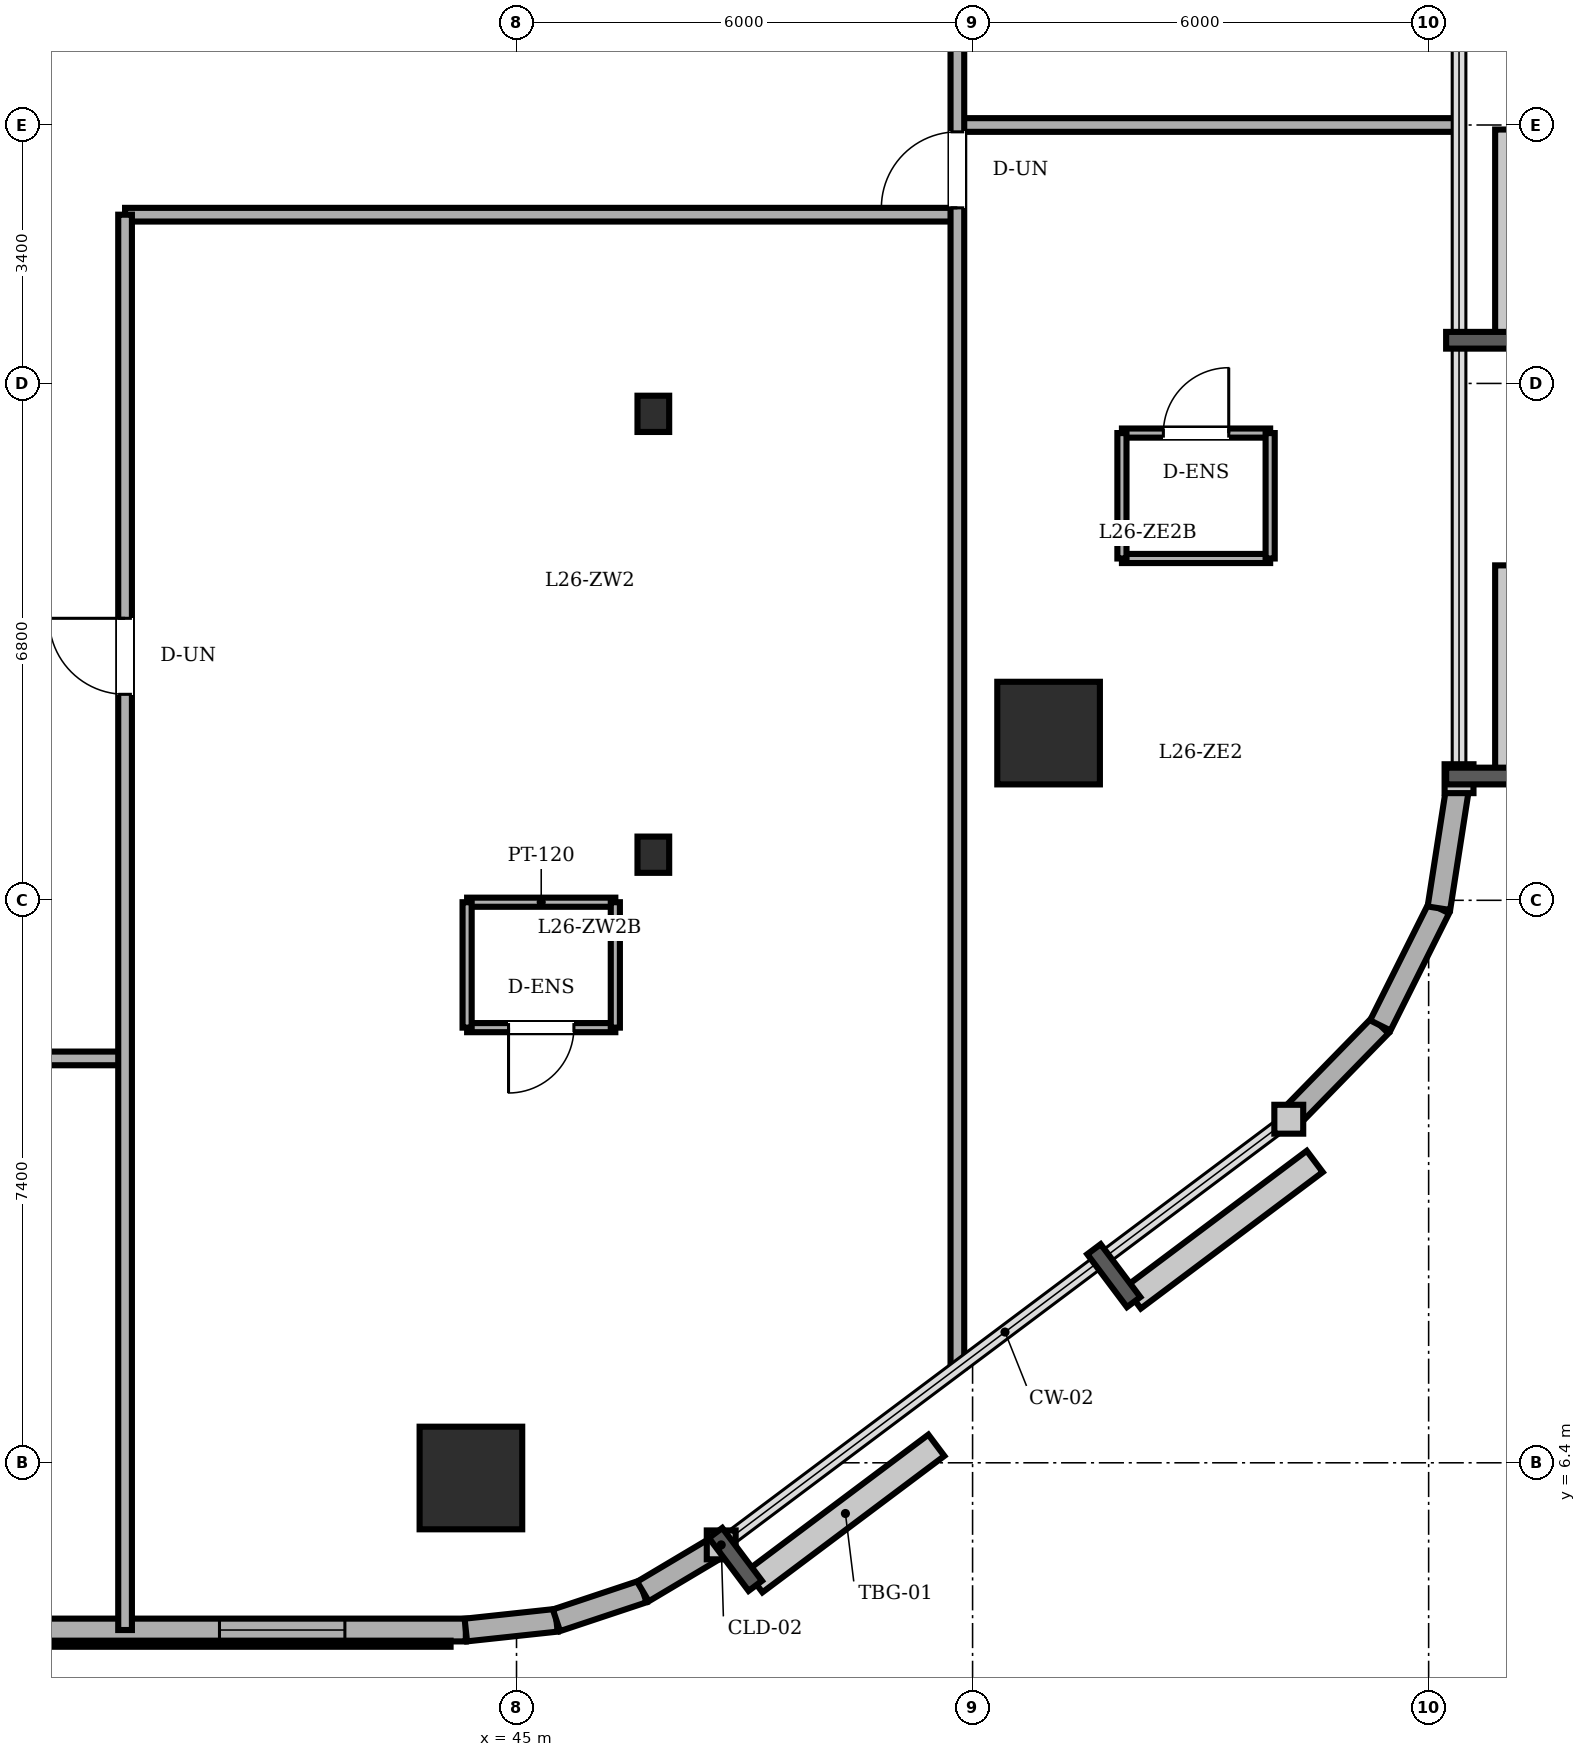
"""IFC4 building model, lengths in metres.
Left out: names, types, materials, properties, quantities, classifications, styles, units other than length and angle.
Written with IfcOpenShell. Run it as: python <this file> out.ifc"""

import sys

from ifc_helpers import new_model, si_unit, direction, frame, frame_2d, origin, origin_2d, place, context, subcontext, project, spatial, rectangle, circle, i_section, extrude, element, fill, save


model = new_model("IFC4")
c1 = context("Model", 3, precision=1e-05, world=origin(), true_north=direction((0.0, 1.0)))
c2 = subcontext(c1, "Body", "Model", "MODEL_VIEW")
j1 = project(units=[si_unit("LENGTHUNIT", "METRE"), si_unit("PLANEANGLEUNIT", "RADIAN")], contexts=[c1])
p1 = place(None, origin())
s1 = spatial("IfcSite", under=j1, at=p1, CompositionType="ELEMENT")
p2 = place(p1, origin())
s2 = spatial("IfcBuilding", under=s1, at=p2, CompositionType="ELEMENT")
p3 = place(p2, frame((0.0, 0.0, 100.7)))
s3 = spatial("IfcBuildingStorey", under=s2, at=p3, CompositionType="ELEMENT", Elevation=100.7)
for number, where, z_axis, x_axis in (
    (1, (44.4, 6.2, 0.0), (0.0, 0.0, 1.0), (1.0, 0.0, 0.0)),
    (2, (52.0, 16.0, 0.0), (0.0, 0.0, 1.0), (1.0, 0.0, 0.0)),
):
    element("IfcColumn", number, at=place(p3, frame(where, z_axis=z_axis, x_axis=x_axis)), inside=s3, PredefinedType="COLUMN", context=c2, shape_type="SweptSolid", body=[
        extrude(circle(Radius=0.675, at=origin_2d()), origin(), (0.0, 0.0, 1.0), 3.6),
    ])
for number, where, z_axis, x_axis in (
    (3, (46.8, 14.4, 0.0), (0.0, 0.0, 1.0), (1.0, 0.0, 0.0)),
    (4, (46.8, 20.2, 0.0), (0.0, 0.0, 1.0), (1.0, 0.0, 0.0)),
):
    element("IfcColumn", number, at=place(p3, frame(where, z_axis=z_axis, x_axis=x_axis)), inside=s3, PredefinedType="COLUMN", context=c2, shape_type="SweptSolid", body=[
        extrude(i_section(OverallWidth=0.417, OverallDepth=0.477, WebThickness=0.036, FlangeThickness=0.057, FilletRadius=0.015, at=origin_2d()), origin(), (0.0, 0.0, 1.0), 3.6),
    ])
p4 = place(p3, frame((14.4, 4.2, 0.0), z_axis=(0.0, 0.0, 1.0), x_axis=(1.0, 0.0, 0.0)))
e5 = element("IfcWall", 5, at=p4, inside=s3, PredefinedType="SOLIDWALL", context=c2, shape_type="SweptSolid", body=[
    extrude(rectangle(XDim=29.933, YDim=0.3, at=frame_2d((14.967, 0.0))), origin(), (0.0, 0.0, 1.0), 3.4),
])
p5 = place(p4, frame((3.85, 0.0, 0.0)))
e6 = element("IfcOpeningElement", 6, at=p5, cuts=e5, PredefinedType="OPENING", context=c2, shape_type="SweptSolid", body=[
    extrude(rectangle(XDim=0.95, YDim=2.2, at=frame_2d((0.475, 1.1))), frame((0.0, 0.16, 0.0), z_axis=(0.0, -1.0, 0.0), x_axis=(1.0, 0.0, 0.0)), (0.0, 0.0, 1.0), 0.32),
])
p6 = place(p4, frame((5.158, 0.0, 0.85)))
e7 = element("IfcOpeningElement", 7, at=p6, cuts=e5, PredefinedType="OPENING", context=c2, shape_type="SweptSolid", body=[
    extrude(rectangle(XDim=1.65, YDim=1.55, at=frame_2d((0.825, 0.775))), frame((0.0, 0.16, 0.0), z_axis=(0.0, -1.0, 0.0), x_axis=(1.0, 0.0, 0.0)), (0.0, 0.0, 1.0), 0.32),
])
p7 = place(p4, frame((9.875, 0.0, 0.85)))
e8 = element("IfcOpeningElement", 8, at=p7, cuts=e5, PredefinedType="OPENING", context=c2, shape_type="SweptSolid", body=[
    extrude(rectangle(XDim=1.65, YDim=1.55, at=frame_2d((0.825, 0.775))), frame((0.0, 0.16, 0.0), z_axis=(0.0, -1.0, 0.0), x_axis=(1.0, 0.0, 0.0)), (0.0, 0.0, 1.0), 0.32),
])
p8 = place(p4, frame((16.058, 0.0, 0.85)))
e9 = element("IfcOpeningElement", 9, at=p8, cuts=e5, PredefinedType="OPENING", context=c2, shape_type="SweptSolid", body=[
    extrude(rectangle(XDim=1.65, YDim=1.55, at=frame_2d((0.825, 0.775))), frame((0.0, 0.16, 0.0), z_axis=(0.0, -1.0, 0.0), x_axis=(1.0, 0.0, 0.0)), (0.0, 0.0, 1.0), 0.32),
])
p9 = place(p4, frame((20.342, 0.0, 0.85)))
e10 = element("IfcOpeningElement", 10, at=p9, cuts=e5, PredefinedType="OPENING", context=c2, shape_type="SweptSolid", body=[
    extrude(rectangle(XDim=1.65, YDim=1.55, at=frame_2d((0.825, 0.775))), frame((0.0, 0.16, 0.0), z_axis=(0.0, -1.0, 0.0), x_axis=(1.0, 0.0, 0.0)), (0.0, 0.0, 1.0), 0.32),
])
p10 = place(p4, frame((26.692, 0.0, 0.85)))
e11 = element("IfcOpeningElement", 11, at=p10, cuts=e5, PredefinedType="OPENING", context=c2, shape_type="SweptSolid", body=[
    extrude(rectangle(XDim=1.65, YDim=1.55, at=frame_2d((0.825, 0.775))), frame((0.0, 0.16, 0.0), z_axis=(0.0, -1.0, 0.0), x_axis=(1.0, 0.0, 0.0)), (0.0, 0.0, 1.0), 0.32),
])
p11 = place(p3, frame((44.333, 4.2, 0.0), z_axis=(0.0, 0.0, 1.0), x_axis=(0.994289103787, 0.106720092254, 0.0)))
e12 = element("IfcWall", 12, at=p11, inside=s3, PredefinedType="SOLIDWALL", context=c2, shape_type="SweptSolid", body=[
    extrude(rectangle(XDim=1.199, YDim=0.3, at=frame_2d((0.599, 0.0))), origin(), (0.0, 0.0, 1.0), 3.4),
])
p12 = place(p3, frame((45.525, 4.328, 0.0), z_axis=(0.0, 0.0, 1.0), x_axis=(0.948744332129, 0.316044604847, 0.0)))
e13 = element("IfcWall", 13, at=p12, inside=s3, PredefinedType="SOLIDWALL", context=c2, shape_type="SweptSolid", body=[
    extrude(rectangle(XDim=1.2, YDim=0.3, at=frame_2d((0.6, 0.0))), origin(), (0.0, 0.0, 1.0), 3.4),
])
p13 = place(p3, frame((46.663, 4.707, 0.0), z_axis=(0.0, 0.0, 1.0), x_axis=(0.859320591642, 0.511437308749, 0.0)))
e14 = element("IfcWall", 14, at=p13, inside=s3, PredefinedType="SOLIDWALL", context=c2, shape_type="SweptSolid", body=[
    extrude(rectangle(XDim=1.199, YDim=0.3, at=frame_2d((0.599, 0.0))), origin(), (0.0, 0.0, 1.0), 3.4),
])
for number, where, z_axis, x_axis in (
    (15, (55.16, 10.92, 0.0), (0.0, 0.0, 1.0), (0.698, 0.716, 0.0)),
    (16, (56.364, 12.154, 0.0), (0.0, 0.0, 1.0), (0.447, 0.894, 0.0)),
):
    element("IfcWall", number, at=place(p3, frame(where, z_axis=z_axis, x_axis=x_axis)), inside=s3, PredefinedType="SOLIDWALL", context=c2, shape_type="SweptSolid", body=[
        extrude(rectangle(XDim=1.724, YDim=0.3, at=frame_2d((0.862, 0.0))), origin(), (0.0, 0.0, 1.0), 3.4),
    ])
p14 = place(p3, frame((57.135, 13.696, 0.0), z_axis=(0.0, 0.0, 1.0), x_axis=(0.153620989032, 0.988129845581, 0.0)))
e17 = element("IfcWall", 17, at=p14, inside=s3, PredefinedType="SOLIDWALL", context=c2, shape_type="SweptSolid", body=[
    extrude(rectangle(XDim=1.724, YDim=0.3, at=frame_2d((0.862, 0.0))), origin(), (0.0, 0.0, 1.0), 3.4),
])
p15 = place(p3, frame((44.35, 13.775, 0.0), z_axis=(0.0, 0.0, 1.0), x_axis=(1.0, 0.0, 0.0)))
e18 = element("IfcWall", 18, at=p15, inside=s3, PredefinedType="PARTITIONING", context=c2, shape_type="SweptSolid", body=[
    extrude(rectangle(XDim=1.95, YDim=0.12, at=frame_2d((0.975, 0.0))), origin(), (0.0, 0.0, 1.0), 3.4),
])
p16 = place(p3, frame((46.3, 12.125, 0.0), z_axis=(0.0, 0.0, 1.0), x_axis=(-1.0, 0.0, 0.0)))
e19 = element("IfcWall", 19, at=p16, inside=s3, PredefinedType="PARTITIONING", context=c2, shape_type="SweptSolid", body=[
    extrude(rectangle(XDim=1.95, YDim=0.12, at=frame_2d((0.975, 0.0))), origin(), (0.0, 0.0, 1.0), 3.4),
])
p17 = place(p16, frame((0.545, 0.0, 0.0)))
e20 = element("IfcOpeningElement", 20, at=p17, cuts=e19, PredefinedType="OPENING", context=c2, shape_type="SweptSolid", body=[
    extrude(rectangle(XDim=0.86, YDim=2.1, at=frame_2d((0.43, 1.05))), frame((0.0, 0.07, 0.0), z_axis=(0.0, -1.0, 0.0), x_axis=(1.0, 0.0, 0.0)), (0.0, 0.0, 1.0), 0.14),
])
p18 = place(p3, frame((44.35, 13.775, 0.0), z_axis=(0.0, 0.0, 1.0), x_axis=(0.0, -1.0, 0.0)))
e21 = element("IfcWall", 21, at=p18, inside=s3, PredefinedType="PARTITIONING", context=c2, shape_type="SweptSolid", body=[
    extrude(rectangle(XDim=1.65, YDim=0.12, at=frame_2d((0.825, 0.0))), origin(), (0.0, 0.0, 1.0), 3.4),
])
p19 = place(p3, frame((46.3, 12.125, 0.0), z_axis=(0.0, 0.0, 1.0), x_axis=(0.0, 1.0, 0.0)))
e22 = element("IfcWall", 22, at=p19, inside=s3, PredefinedType="PARTITIONING", context=c2, shape_type="SweptSolid", body=[
    extrude(rectangle(XDim=1.65, YDim=0.12, at=frame_2d((0.825, 0.0))), origin(), (0.0, 0.0, 1.0), 2.882),
])
p20 = place(p3, frame((52.965, 19.947, 0.0), z_axis=(0.0, 0.0, 1.0), x_axis=(1.0, 0.0, 0.0)))
e23 = element("IfcWall", 23, at=p20, inside=s3, PredefinedType="PARTITIONING", context=c2, shape_type="SweptSolid", body=[
    extrude(rectangle(XDim=1.95, YDim=0.12, at=frame_2d((0.975, 0.0))), origin(), (0.0, 0.0, 1.0), 3.4),
])
p21 = place(p20, frame((0.545, 0.0, 0.0)))
e24 = element("IfcOpeningElement", 24, at=p21, cuts=e23, PredefinedType="OPENING", context=c2, shape_type="SweptSolid", body=[
    extrude(rectangle(XDim=0.86, YDim=2.1, at=frame_2d((0.43, 1.05))), frame((0.0, 0.07, 0.0), z_axis=(0.0, -1.0, 0.0), x_axis=(1.0, 0.0, 0.0)), (0.0, 0.0, 1.0), 0.14),
])
p22 = place(p3, frame((54.915, 18.297, 0.0), z_axis=(0.0, 0.0, 1.0), x_axis=(-1.0, 0.0, 0.0)))
e25 = element("IfcWall", 25, at=p22, inside=s3, PredefinedType="PARTITIONING", context=c2, shape_type="SweptSolid", body=[
    extrude(rectangle(XDim=1.95, YDim=0.12, at=frame_2d((0.975, 0.0))), origin(), (0.0, 0.0, 1.0), 3.4),
])
for number, where, z_axis, x_axis in (
    (26, (52.965, 19.947, 0.0), (0.0, 0.0, 1.0), (0.0, -1.0, 0.0)),
    (27, (54.915, 18.297, 0.0), (0.0, 0.0, 1.0), (0.0, 1.0, 0.0)),
):
    element("IfcWall", number, at=place(p3, frame(where, z_axis=z_axis, x_axis=x_axis)), inside=s3, PredefinedType="PARTITIONING", context=c2, shape_type="SweptSolid", body=[
        extrude(rectangle(XDim=1.65, YDim=0.12, at=frame_2d((0.825, 0.0))), origin(), (0.0, 0.0, 1.0), 3.4),
    ])
p23 = place(p3, frame((8.8, 11.72, 0.0), z_axis=(0.0, 0.0, 1.0), x_axis=(1.0, 0.0, 0.0)))
e28 = element("IfcWall", 28, at=p23, inside=s3, PredefinedType="PARTITIONING", context=c2, shape_type="SweptSolid", body=[
    extrude(rectangle(XDim=31.05, YDim=0.18, at=frame_2d((15.525, 0.0))), origin(), (0.0, 0.0, 1.0), 3.4),
])
p24 = place(p23, frame((15.84, 0.0, 0.0)))
e29 = element("IfcOpeningElement", 29, at=p24, cuts=e28, PredefinedType="OPENING", context=c2, shape_type="SweptSolid", body=[
    extrude(rectangle(XDim=0.92, YDim=2.1, at=frame_2d((0.46, 1.05))), frame((0.0, 0.1, 0.0), z_axis=(0.0, -1.0, 0.0), x_axis=(1.0, 0.0, 0.0)), (0.0, 0.0, 1.0), 0.2),
])
p25 = place(p23, frame((7.34, 0.0, 0.0)))
e30 = element("IfcOpeningElement", 30, at=p25, cuts=e28, PredefinedType="OPENING", context=c2, shape_type="SweptSolid", body=[
    extrude(rectangle(XDim=0.92, YDim=2.1, at=frame_2d((0.46, 1.05))), frame((0.0, 0.1, 0.0), z_axis=(0.0, -1.0, 0.0), x_axis=(1.0, 0.0, 0.0)), (0.0, 0.0, 1.0), 0.2),
])
p26 = place(p23, frame((23.905, 0.0, 0.0)))
e31 = element("IfcOpeningElement", 31, at=p26, cuts=e28, PredefinedType="OPENING", context=c2, shape_type="SweptSolid", body=[
    extrude(rectangle(XDim=0.92, YDim=2.1, at=frame_2d((0.46, 1.05))), frame((0.0, 0.1, 0.0), z_axis=(0.0, -1.0, 0.0), x_axis=(1.0, 0.0, 0.0)), (0.0, 0.0, 1.0), 0.2),
])
p27 = place(p3, frame((39.85, 22.82, 0.0), z_axis=(0.0, 0.0, 1.0), x_axis=(1.0, 0.0, 0.0)))
e32 = element("IfcWall", 32, at=p27, inside=s3, PredefinedType="PARTITIONING", context=c2, shape_type="SweptSolid", body=[
    extrude(rectangle(XDim=10.95, YDim=0.18, at=frame_2d((5.475, 0.0))), origin(), (0.0, 0.0, 1.0), 3.4),
])
p28 = place(p3, frame((50.8, 24.0, 0.0), z_axis=(0.0, 0.0, 1.0), x_axis=(1.0, 0.0, 0.0)))
e33 = element("IfcWall", 33, at=p28, inside=s3, PredefinedType="PARTITIONING", context=c2, shape_type="SweptSolid", body=[
    extrude(rectangle(XDim=6.6, YDim=0.18, at=frame_2d((3.3, 0.0))), origin(), (0.0, 0.0, 1.0), 3.182),
])
p29 = place(p3, frame((39.85, 4.2, 0.0), z_axis=(0.0, 0.0, 1.0), x_axis=(0.0, 1.0, 0.0)))
e34 = element("IfcWall", 34, at=p29, inside=s3, PredefinedType="PARTITIONING", context=c2, shape_type="SweptSolid", body=[
    extrude(rectangle(XDim=18.62, YDim=0.18, at=frame_2d((9.31, 0.0))), origin(), (0.0, 0.0, 1.0), 3.4),
])
p30 = place(p29, frame((12.31, 0.0, 0.0)))
e35 = element("IfcOpeningElement", 35, at=p30, cuts=e34, PredefinedType="OPENING", context=c2, shape_type="SweptSolid", body=[
    extrude(rectangle(XDim=1.0, YDim=2.15, at=frame_2d((0.5, 1.075))), frame((0.0, 0.1, 0.0), z_axis=(0.0, -1.0, 0.0), x_axis=(1.0, 0.0, 0.0)), (0.0, 0.0, 1.0), 0.2),
])
p31 = place(p3, frame((50.8, 7.65, 0.0), z_axis=(0.0, 0.0, 1.0), x_axis=(0.0, 1.0, 0.0)))
e36 = element("IfcWall", 36, at=p31, inside=s3, PredefinedType="PARTITIONING", context=c2, shape_type="SweptSolid", body=[
    extrude(rectangle(XDim=22.7, YDim=0.18, at=frame_2d((11.35, 0.0))), origin(), (0.0, 0.0, 1.0), 3.4),
])
p32 = place(p31, frame((18.765, 0.0, 0.0)))
e37 = element("IfcOpeningElement", 37, at=p32, cuts=e36, PredefinedType="OPENING", context=c2, shape_type="SweptSolid", body=[
    extrude(rectangle(XDim=1.0, YDim=2.15, at=frame_2d((0.5, 1.075))), frame((0.0, 0.1, 0.0), z_axis=(0.0, -1.0, 0.0), x_axis=(1.0, 0.0, 0.0)), (0.0, 0.0, 1.0), 0.2),
])
p33 = place(p31, frame((15.26, 0.0, 0.0)))
e38 = element("IfcOpeningElement", 38, at=p33, cuts=e36, PredefinedType="OPENING", context=c2, shape_type="SweptSolid", body=[
    extrude(rectangle(XDim=1.0, YDim=2.15, at=frame_2d((0.5, 1.075))), frame((0.0, 0.1, 0.0), z_axis=(0.0, -1.0, 0.0), x_axis=(1.0, 0.0, 0.0)), (0.0, 0.0, 1.0), 0.2),
])
p34 = place(p10, origin())
e39 = element("IfcWindow", 39, at=p34, inside=s3, PartitioningType="DOUBLE_PANEL_VERTICAL", PredefinedType="WINDOW", context=c2, shape_type="SweptSolid", body=[
    extrude(rectangle(XDim=1.65, YDim=1.55, at=frame_2d((0.825, 0.775))), frame((0.0, 0.03, 0.0), z_axis=(0.0, -1.0, 0.0), x_axis=(1.0, 0.0, 0.0)), (0.0, 0.0, 1.0), 0.06),
])
fill(e11, e39)
p35 = place(p17, origin())
e40 = element("IfcDoor", 40, at=p35, inside=s3, OperationType="SINGLE_SWING_RIGHT", PredefinedType="DOOR", context=c2, shape_type="SweptSolid", body=[
    extrude(rectangle(XDim=0.86, YDim=2.1, at=frame_2d((0.43, 1.05))), frame((0.0, 0.025, 0.0), z_axis=(0.0, -1.0, 0.0), x_axis=(1.0, 0.0, 0.0)), (0.0, 0.0, 1.0), 0.05),
])
fill(e20, e40)
p36 = place(p21, origin())
e41 = element("IfcDoor", 41, at=p36, inside=s3, OperationType="SINGLE_SWING_RIGHT", PredefinedType="DOOR", context=c2, shape_type="SweptSolid", body=[
    extrude(rectangle(XDim=0.86, YDim=2.1, at=frame_2d((0.43, 1.05))), frame((0.0, 0.025, 0.0), z_axis=(0.0, -1.0, 0.0), x_axis=(1.0, 0.0, 0.0)), (0.0, 0.0, 1.0), 0.05),
])
fill(e24, e41)
p37 = place(p30, origin())
e42 = element("IfcDoor", 42, at=p37, inside=s3, OperationType="SINGLE_SWING_RIGHT", PredefinedType="DOOR", context=c2, shape_type="SweptSolid", body=[
    extrude(rectangle(XDim=1.0, YDim=2.15, at=frame_2d((0.5, 1.075))), frame((0.0, 0.025, 0.0), z_axis=(0.0, -1.0, 0.0), x_axis=(1.0, 0.0, 0.0)), (0.0, 0.0, 1.0), 0.05),
])
fill(e35, e42)
p38 = place(p33, origin())
e43 = element("IfcDoor", 43, at=p38, inside=s3, OperationType="SINGLE_SWING_LEFT", PredefinedType="DOOR", context=c2, shape_type="SweptSolid", body=[
    extrude(rectangle(XDim=1.0, YDim=2.15, at=frame_2d((0.5, 1.075))), frame((0.0, 0.025, 0.0), z_axis=(0.0, -1.0, 0.0), x_axis=(1.0, 0.0, 0.0)), (0.0, 0.0, 1.0), 0.05),
])
fill(e38, e43)
save(model, sys.argv[1])
